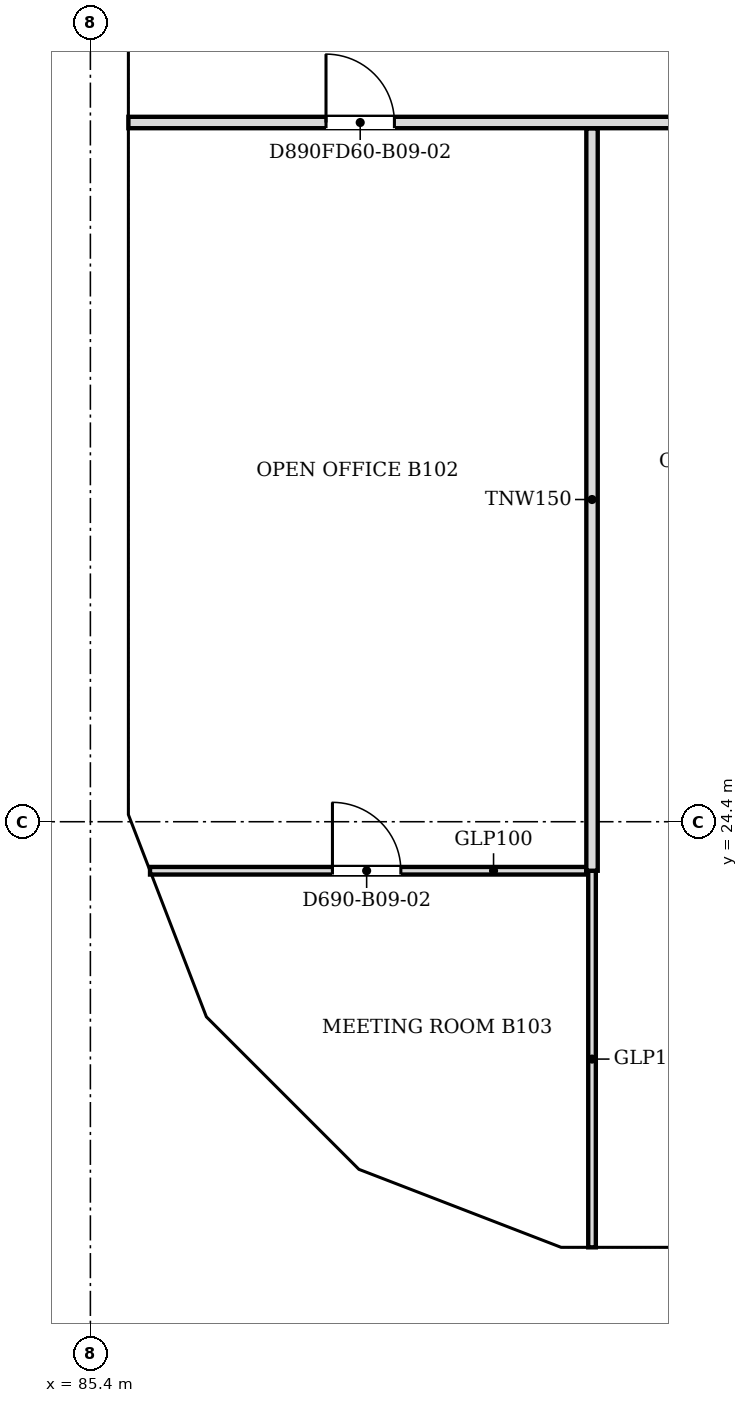
"""IFC4 building model, lengths in metres.
Left out: names, types, materials, properties, quantities, classifications, styles, units other than length and angle.
Written with IfcOpenShell. Run it as: python <this file> out.ifc"""

import sys

from ifc_helpers import new_model, si_unit, direction, frame, frame_2d, origin, place, context, subcontext, project, spatial, polyline, rectangle, outline, extrude, faceted_brep, source, transform, mapped, element, fill, save


model = new_model("IFC4")
c1 = context("Model", 3, precision=1e-05, world=origin(), true_north=direction((0.0, 1.0)))
c2 = subcontext(c1, "Body", "Model", "MODEL_VIEW")
j1 = project(units=[si_unit("LENGTHUNIT", "METRE"), si_unit("PLANEANGLEUNIT", "RADIAN")], contexts=[c1])
p1 = place(None, origin())
s1 = spatial("IfcSite", under=j1, at=p1, CompositionType="ELEMENT")
p2 = place(p1, origin())
s2 = spatial("IfcBuilding", under=s1, at=p2, CompositionType="ELEMENT")
p3 = place(p2, frame((0.0, 0.0, 87.6)))
s3 = spatial("IfcBuildingStorey", under=s2, at=p3, CompositionType="ELEMENT", Elevation=87.6)
m1 = source(origin(), c2, "Body", "Brep", [
    faceted_brep([(3.003, -0.25, 0.0), (6.053, -0.25, 3.8), (3.003, -0.25, 7.6), (0.0, -0.25, 3.8), (0.047, 0.25, 3.859), (3.003, 0.25, 7.6), (6.053, 0.25, 3.8), (3.003, 0.25, 0.0), (0.047, 0.25, 3.741), (0.0, 0.0, 3.8)], [[[0, 1, 2, 3]], [[4, 5, 6, 7, 8]], [[7, 6, 1, 0]], [[6, 5, 2, 1]], [[5, 4, 9, 3, 2]], [[8, 7, 0, 3, 9]], [[8, 9, 4]]]),
])
p4 = place(p3, frame((91.547, 18.55, -3.8), z_axis=(0.0, 0.0, 1.0), x_axis=(1.0, 0.0, 0.0)))
e1 = element("IfcWall", 1, at=p4, inside=s3, PredefinedType="SOLIDWALL", context=c2, shape_type="MappedRepresentation", body=[
    mapped(m1, transform((0.0, 0.0, 0.0), scale=1.0)),
])
m2 = source(origin(), c2, "Body", "SweptSolid", [
    extrude(outline(polyline([(3.005, 0.401), (5.733, 3.8), (3.005, 7.199), (0.319, 3.8), (3.005, 0.401)])), frame((0.0, 0.26, 0.0), z_axis=(0.0, -1.0, 0.0), x_axis=(1.0, 0.0, 0.0)), (0.0, 0.0, 1.0), 0.52),
])
p5 = place(p4, origin())
e2 = element("IfcOpeningElement", 2, at=p5, cuts=e1, PredefinedType="OPENING", context=c2, shape_type="MappedRepresentation", body=[
    mapped(m2, transform((0.0, 0.0, 0.0), scale=1.0)),
])
m3 = source(origin(), c2, "Body", "Brep", [
    faceted_brep([(3.05, -0.25, 0.0), (6.1, -0.25, 3.8), (6.1, -0.25, 3.8), (3.05, -0.25, 7.6), (0.0, -0.25, 3.8), (0.0, 0.25, 3.8), (3.05, 0.25, 7.6), (6.1, 0.25, 3.8), (6.1, 0.25, 3.8), (3.05, 0.25, 0.0)], [[[0, 1, 2, 3, 4]], [[5, 6, 7, 8, 9]], [[9, 8, 1, 0]], [[7, 6, 3, 2]], [[6, 5, 4, 3]], [[5, 9, 0, 4]], [[1, 8, 7, 2]]]),
])
p6 = place(p3, frame((85.65, 39.65, -3.8), z_axis=(0.0, 0.0, 1.0), x_axis=(0.0, -1.0, 0.0)))
e3 = element("IfcWall", 3, at=p6, inside=s3, PredefinedType="SOLIDWALL", context=c2, shape_type="MappedRepresentation", body=[
    mapped(m3, transform((0.0, 0.0, 0.0), scale=1.0)),
])
m4 = source(origin(), c2, "Body", "SweptSolid", [
    extrude(outline(polyline([(3.05, 0.399), (5.78, 3.8), (3.05, 7.2), (0.321, 3.8), (3.05, 0.399)])), frame((0.0, 0.26, 0.0), z_axis=(0.0, -1.0, 0.0), x_axis=(1.0, 0.0, 0.0)), (0.0, 0.0, 1.0), 0.52),
])
p7 = place(p6, origin())
e4 = element("IfcOpeningElement", 4, at=p7, cuts=e3, PredefinedType="OPENING", context=c2, shape_type="MappedRepresentation", body=[
    mapped(m4, transform((0.0, 0.0, 0.0), scale=1.0)),
])
m5 = source(origin(), c2, "Body", "SweptSolid", [
    extrude(outline(polyline([(3.05, 0.0), (6.1, 3.8), (3.05, 7.6), (0.0, 3.8), (3.05, 0.0)])), frame((0.0, 0.25, 0.0), z_axis=(0.0, -1.0, 0.0), x_axis=(1.0, 0.0, 0.0)), (0.0, 0.0, 1.0), 0.5),
])
p8 = place(p3, frame((85.65, 33.55, -3.8), z_axis=(0.0, 0.0, 1.0), x_axis=(0.0, -1.0, 0.0)))
e5 = element("IfcWall", 5, at=p8, inside=s3, PredefinedType="SOLIDWALL", context=c2, shape_type="MappedRepresentation", body=[
    mapped(m5, transform((0.0, 0.0, 0.0), scale=1.0)),
])
p9 = place(p8, origin())
e6 = element("IfcOpeningElement", 6, at=p9, cuts=e5, PredefinedType="OPENING", context=c2, shape_type="MappedRepresentation", body=[
    mapped(m4, transform((0.0, 0.0, 0.0), scale=1.0)),
])
m6 = source(origin(), c2, "Body", "Brep", [
    faceted_brep([(3.003, -0.25, 0.0), (3.05, -0.25, 0.06), (3.05, -0.25, 7.54), (3.003, -0.25, 7.6), (0.0, -0.25, 3.8), (0.0, 0.25, 3.8), (2.957, 0.25, 7.541), (2.957, 0.25, 0.059), (3.003, 0.0, 0.0), (3.003, 0.0, 7.6)], [[[0, 1, 2, 3, 4]], [[5, 6, 7]], [[1, 0, 8]], [[9, 3, 2]], [[6, 5, 4, 3, 9]], [[5, 7, 8, 0, 4]], [[1, 8, 7, 6, 9, 2]]]),
])
p10 = place(p3, frame((85.65, 27.45, -3.8), z_axis=(0.0, 0.0, 1.0), x_axis=(0.0, -1.0, 0.0)))
e7 = element("IfcWall", 7, at=p10, inside=s3, PredefinedType="SOLIDWALL", context=c2, shape_type="MappedRepresentation", body=[
    mapped(m6, transform((0.0, 0.0, 0.0), scale=1.0)),
])
m7 = source(origin(), c2, "Body", "SweptSolid", [
    extrude(outline(polyline([(2.803, 6.944), (0.319, 3.8), (2.803, 0.656), (2.803, 6.944)])), frame((0.0, 0.26, 0.0), z_axis=(0.0, -1.0, 0.0), x_axis=(1.0, 0.0, 0.0)), (0.0, 0.0, 1.0), 0.52),
])
p11 = place(p10, origin())
e8 = element("IfcOpeningElement", 8, at=p11, cuts=e7, PredefinedType="OPENING", context=c2, shape_type="MappedRepresentation", body=[
    mapped(m7, transform((0.0, 0.0, 0.0), scale=1.0)),
])
m8 = source(origin(), c2, "Body", "Brep", [
    faceted_brep([(0.047, -0.25, 0.0), (2.997, -0.25, 3.8), (0.047, -0.25, 7.6), (0.0, -0.25, 7.541), (0.0, -0.25, 0.059), (0.093, 0.25, 7.54), (2.944, 0.25, 3.868), (2.944, 0.25, 3.732), (0.093, 0.25, 0.06), (2.997, 0.0, 3.8), (0.047, 0.0, 0.0), (0.047, 0.0, 7.6)], [[[0, 1, 2, 3, 4]], [[5, 6, 7, 8]], [[8, 7, 9, 1, 0, 10]], [[6, 5, 11, 2, 1, 9]], [[3, 2, 11]], [[10, 0, 4]], [[8, 10, 4, 3, 11, 5]], [[7, 6, 9]]]),
])
p12 = place(p3, frame((85.633, 24.49, -3.8), z_axis=(0.0, 0.0, 1.0), x_axis=(0.359901446078, -0.932990326376, 0.0)))
e9 = element("IfcWall", 9, at=p12, inside=s3, PredefinedType="SOLIDWALL", context=c2, shape_type="MappedRepresentation", body=[
    mapped(m8, transform((0.0, 0.0, 0.0), scale=1.0)),
])
m9 = source(origin(), c2, "Body", "SweptSolid", [
    extrude(outline(polyline([(0.247, 0.665), (2.681, 3.8), (0.247, 6.935), (0.247, 0.665)])), frame((0.0, 0.26, 0.0), z_axis=(0.0, -1.0, 0.0), x_axis=(1.0, 0.0, 0.0)), (0.0, 0.0, 1.0), 0.52),
])
p13 = place(p12, origin())
e10 = element("IfcOpeningElement", 10, at=p13, cuts=e9, PredefinedType="OPENING", context=c2, shape_type="MappedRepresentation", body=[
    mapped(m9, transform((0.0, 0.0, 0.0), scale=1.0)),
])
m10 = source(origin(), c2, "Body", "Brep", [
    faceted_brep([(2.944, -0.25, 0.0), (2.997, -0.25, 0.068), (2.997, -0.25, 7.532), (2.944, -0.25, 7.6), (0.0, -0.25, 3.8), (0.053, 0.25, 3.868), (2.891, 0.25, 7.532), (2.891, 0.25, 0.068), (0.053, 0.25, 3.732), (2.944, 0.0, 0.0), (2.944, 0.0, 7.6), (0.0, 0.0, 3.8)], [[[0, 1, 2, 3, 4]], [[5, 6, 7, 8]], [[1, 0, 9]], [[10, 3, 2]], [[6, 5, 11, 4, 3, 10]], [[8, 7, 9, 0, 4, 11]], [[8, 11, 5]], [[1, 9, 7, 6, 10, 2]]]),
])
p14 = place(p3, frame((86.712, 21.694, -3.8), z_axis=(0.0, 0.0, 1.0), x_axis=(0.707066050402, -0.707147509625, 0.0)))
e11 = element("IfcWall", 11, at=p14, inside=s3, PredefinedType="SOLIDWALL", context=c2, shape_type="MappedRepresentation", body=[
    mapped(m10, transform((0.0, 0.0, 0.0), scale=1.0)),
])
m11 = source(origin(), c2, "Body", "SweptSolid", [
    extrude(outline(polyline([(2.744, 6.934), (0.316, 3.8), (2.744, 0.666), (2.744, 6.934)])), frame((0.0, 0.26, 0.0), z_axis=(0.0, -1.0, 0.0), x_axis=(1.0, 0.0, 0.0)), (0.0, 0.0, 1.0), 0.52),
])
p15 = place(p14, origin())
e12 = element("IfcOpeningElement", 12, at=p15, cuts=e11, PredefinedType="OPENING", context=c2, shape_type="MappedRepresentation", body=[
    mapped(m11, transform((0.0, 0.0, 0.0), scale=1.0)),
])
m12 = source(origin(), c2, "Body", "Brep", [
    faceted_brep([(0.053, -0.25, 0.0), (3.003, -0.25, 3.8), (0.053, -0.25, 7.6), (0.0, -0.25, 7.531), (0.0, -0.25, 0.068), (0.106, 0.25, 7.532), (2.957, 0.25, 3.86), (2.957, 0.25, 3.74), (0.106, 0.25, 0.068), (3.003, 0.0, 3.8), (0.053, 0.0, 0.0), (0.053, 0.0, 7.6)], [[[0, 1, 2, 3, 4]], [[5, 6, 7, 8]], [[8, 7, 9, 1, 0, 10]], [[6, 5, 11, 2, 1, 9]], [[3, 2, 11]], [[10, 0, 4]], [[8, 10, 4, 3, 11, 5]], [[7, 6, 9]]]),
])
p16 = place(p3, frame((88.744, 19.631, -3.8), z_axis=(0.0, 0.0, 1.0), x_axis=(0.932997369089, -0.359883188373, 0.0)))
e13 = element("IfcWall", 13, at=p16, inside=s3, PredefinedType="SOLIDWALL", context=c2, shape_type="MappedRepresentation", body=[
    mapped(m12, transform((0.0, 0.0, 0.0), scale=1.0)),
])
m13 = source(origin(), c2, "Body", "SweptSolid", [
    extrude(outline(polyline([(0.253, 0.665), (2.687, 3.8), (0.253, 6.935), (0.253, 0.665)])), frame((0.0, 0.26, 0.0), z_axis=(0.0, -1.0, 0.0), x_axis=(1.0, 0.0, 0.0)), (0.0, 0.0, 1.0), 0.52),
])
p17 = place(p16, origin())
e14 = element("IfcOpeningElement", 14, at=p17, cuts=e13, PredefinedType="OPENING", context=c2, shape_type="MappedRepresentation", body=[
    mapped(m13, transform((0.0, 0.0, 0.0), scale=1.0)),
])
p18 = place(p2, frame((0.0, 0.0, 91.4)))
s4 = spatial("IfcBuildingStorey", under=s2, at=p18, CompositionType="ELEMENT", Elevation=91.4)
m14 = source(origin(), c2, "Body", "Brep", [
    faceted_brep([(0.047, -0.25, 0.0), (3.05, -0.25, 3.8), (0.047, -0.25, 7.6), (0.0, -0.25, 7.54), (0.0, -0.25, 0.06), (0.093, 0.25, 7.541), (3.05, 0.25, 3.8), (0.093, 0.25, 0.059), (0.047, 0.0, 0.0), (0.047, 0.0, 7.6)], [[[0, 1, 2, 3, 4]], [[5, 6, 7]], [[7, 6, 1, 0, 8]], [[6, 5, 9, 2, 1]], [[3, 2, 9]], [[8, 0, 4]], [[7, 8, 4, 3, 9, 5]]]),
])
p19 = place(p18, frame((91.5, 18.55, -3.8), z_axis=(0.0, 0.0, 1.0), x_axis=(1.0, 0.0, 0.0)))
e15 = element("IfcWall", 15, at=p19, inside=s4, PredefinedType="SOLIDWALL", context=c2, shape_type="MappedRepresentation", body=[
    mapped(m14, transform((0.0, 0.0, 0.0), scale=1.0)),
])
m15 = source(origin(), c2, "Body", "SweptSolid", [
    extrude(outline(polyline([(0.247, 0.656), (2.731, 3.8), (0.247, 6.944), (0.247, 0.656)])), frame((0.0, 0.26, 0.0), z_axis=(0.0, -1.0, 0.0), x_axis=(1.0, 0.0, 0.0)), (0.0, 0.0, 1.0), 0.52),
])
p20 = place(p19, origin())
e16 = element("IfcOpeningElement", 16, at=p20, cuts=e15, PredefinedType="OPENING", context=c2, shape_type="MappedRepresentation", body=[
    mapped(m15, transform((0.0, 0.0, 0.0), scale=1.0)),
])
m16 = source(origin(), c2, "Body", "Brep", [
    faceted_brep([(2.95, -0.25, 0.0), (2.997, -0.25, 0.059), (2.997, -0.25, 7.541), (2.95, -0.25, 7.6), (0.0, -0.25, 3.8), (0.053, 0.25, 3.868), (2.904, 0.25, 7.54), (2.904, 0.25, 0.06), (0.053, 0.25, 3.732), (2.95, 0.0, 0.0), (2.95, 0.0, 7.6), (0.0, 0.0, 3.8)], [[[0, 1, 2, 3, 4]], [[5, 6, 7, 8]], [[1, 0, 9]], [[10, 3, 2]], [[6, 5, 11, 4, 3, 10]], [[8, 7, 9, 0, 4, 11]], [[8, 11, 5]], [[1, 9, 7, 6, 10, 2]]]),
])
p21 = place(p18, frame((88.794, 19.612, -3.8), z_axis=(0.0, 0.0, 1.0), x_axis=(0.933000876937, -0.359874094142, 0.0)))
e17 = element("IfcWall", 17, at=p21, inside=s4, PredefinedType="SOLIDWALL", context=c2, shape_type="MappedRepresentation", body=[
    mapped(m16, transform((0.0, 0.0, 0.0), scale=1.0)),
])
m17 = source(origin(), c2, "Body", "SweptSolid", [
    extrude(outline(polyline([(2.75, 6.935), (0.316, 3.8), (2.75, 0.665), (2.75, 6.935)])), frame((0.0, 0.26, 0.0), z_axis=(0.0, -1.0, 0.0), x_axis=(1.0, 0.0, 0.0)), (0.0, 0.0, 1.0), 0.52),
])
p22 = place(p21, origin())
e18 = element("IfcOpeningElement", 18, at=p22, cuts=e17, PredefinedType="OPENING", context=c2, shape_type="MappedRepresentation", body=[
    mapped(m17, transform((0.0, 0.0, 0.0), scale=1.0)),
])
m18 = source(origin(), c2, "Body", "SweptSolid", [
    extrude(outline(polyline([(3.05, 0.0), (6.1, 3.8), (3.05, 7.6), (0.0, 3.8), (3.05, 0.0)])), frame((0.0, 0.25, 0.0), z_axis=(0.0, -1.0, 0.0), x_axis=(1.0, 0.0, 0.0)), (0.0, 0.0, 1.0), 0.5),
])
p23 = place(p18, frame((85.65, 36.6, -3.8), z_axis=(0.0, 0.0, 1.0), x_axis=(0.0, -1.0, 0.0)))
e19 = element("IfcWall", 19, at=p23, inside=s4, PredefinedType="SOLIDWALL", context=c2, shape_type="MappedRepresentation", body=[
    mapped(m18, transform((0.0, 0.0, 0.0), scale=1.0)),
])
m19 = source(origin(), c2, "Body", "SweptSolid", [
    extrude(outline(polyline([(3.05, 0.399), (5.78, 3.8), (3.05, 7.2), (0.321, 3.8), (3.05, 0.399)])), frame((0.0, 0.26, 0.0), z_axis=(0.0, -1.0, 0.0), x_axis=(1.0, 0.0, 0.0)), (0.0, 0.0, 1.0), 0.52),
])
p24 = place(p23, origin())
e20 = element("IfcOpeningElement", 20, at=p24, cuts=e19, PredefinedType="OPENING", context=c2, shape_type="MappedRepresentation", body=[
    mapped(m19, transform((0.0, 0.0, 0.0), scale=1.0)),
])
m20 = source(origin(), c2, "Body", "Brep", [
    faceted_brep([(3.05, -0.25, 0.0), (6.053, -0.25, 3.8), (3.05, -0.25, 7.6), (0.0, -0.25, 3.8), (0.0, 0.25, 3.8), (3.05, 0.25, 7.6), (6.007, 0.25, 3.859), (6.007, 0.25, 3.741), (3.05, 0.25, 0.0), (6.053, 0.0, 3.8)], [[[0, 1, 2, 3]], [[4, 5, 6, 7, 8]], [[8, 7, 9, 1, 0]], [[6, 5, 2, 1, 9]], [[5, 4, 3, 2]], [[4, 8, 0, 3]], [[9, 7, 6]]]),
])
p25 = place(p18, frame((85.65, 30.5, -3.8), z_axis=(0.0, 0.0, 1.0), x_axis=(0.0, -1.0, 0.0)))
e21 = element("IfcWall", 21, at=p25, inside=s4, PredefinedType="SOLIDWALL", context=c2, shape_type="MappedRepresentation", body=[
    mapped(m20, transform((0.0, 0.0, 0.0), scale=1.0)),
])
m21 = source(origin(), c2, "Body", "SweptSolid", [
    extrude(outline(polyline([(3.049, 0.401), (5.735, 3.8), (3.049, 7.199), (0.321, 3.8), (3.049, 0.401)])), frame((0.0, 0.26, 0.0), z_axis=(0.0, -1.0, 0.0), x_axis=(1.0, 0.0, 0.0)), (0.0, 0.0, 1.0), 0.52),
])
p26 = place(p25, origin())
e22 = element("IfcOpeningElement", 22, at=p26, cuts=e21, PredefinedType="OPENING", context=c2, shape_type="MappedRepresentation", body=[
    mapped(m21, transform((0.0, 0.0, 0.0), scale=1.0)),
])
m22 = source(origin(), c2, "Body", "Brep", [
    faceted_brep([(2.95, -0.25, 0.0), (3.003, -0.25, 0.068), (3.003, -0.25, 7.531), (2.95, -0.25, 7.6), (0.0, -0.25, 3.8), (0.047, 0.25, 3.86), (2.898, 0.25, 7.532), (2.898, 0.25, 0.068), (0.047, 0.25, 3.74), (2.95, 0.0, 0.0), (2.95, 0.0, 7.6), (0.0, 0.0, 3.8)], [[[0, 1, 2, 3, 4]], [[5, 6, 7, 8]], [[1, 0, 9]], [[10, 3, 2]], [[6, 5, 11, 4, 3, 10]], [[8, 7, 9, 0, 4, 11]], [[8, 11, 5]], [[1, 9, 7, 6, 10, 2]]]),
])
p27 = place(p18, frame((85.65, 24.447, -3.8), z_axis=(0.0, 0.0, 1.0), x_axis=(0.35992665181, -0.932980602862, 0.0)))
e23 = element("IfcWall", 23, at=p27, inside=s4, PredefinedType="SOLIDWALL", context=c2, shape_type="MappedRepresentation", body=[
    mapped(m22, transform((0.0, 0.0, 0.0), scale=1.0)),
])
p28 = place(p27, origin())
e24 = element("IfcOpeningElement", 24, at=p28, cuts=e23, PredefinedType="OPENING", context=c2, shape_type="MappedRepresentation", body=[
    mapped(m17, transform((0.0, 0.0, 0.0), scale=1.0)),
])
m23 = source(origin(), c2, "Body", "Brep", [
    faceted_brep([(0.053, -0.25, 0.0), (2.997, -0.25, 3.8), (0.053, -0.25, 7.6), (0.0, -0.25, 7.532), (0.0, -0.25, 0.068), (0.106, 0.25, 7.531), (2.944, 0.25, 3.868), (2.944, 0.25, 3.732), (0.106, 0.25, 0.068), (2.997, 0.0, 3.8), (0.053, 0.0, 0.0), (0.053, 0.0, 7.6)], [[[0, 1, 2, 3, 4]], [[5, 6, 7, 8]], [[8, 7, 9, 1, 0, 10]], [[6, 5, 11, 2, 1, 9]], [[3, 2, 11]], [[10, 0, 4]], [[8, 10, 4, 3, 11, 5]], [[9, 7, 6]]]),
])
p29 = place(p18, frame((86.675, 21.731, -3.8), z_axis=(0.0, 0.0, 1.0), x_axis=(0.707106781187, -0.707106781187, 0.0)))
e25 = element("IfcWall", 25, at=p29, inside=s4, PredefinedType="SOLIDWALL", context=c2, shape_type="MappedRepresentation", body=[
    mapped(m23, transform((0.0, 0.0, 0.0), scale=1.0)),
])
m24 = source(origin(), c2, "Body", "SweptSolid", [
    extrude(outline(polyline([(0.253, 0.666), (2.681, 3.8), (0.253, 6.934), (0.253, 0.666)])), frame((0.0, 0.26, 0.0), z_axis=(0.0, -1.0, 0.0), x_axis=(1.0, 0.0, 0.0)), (0.0, 0.0, 1.0), 0.52),
])
p30 = place(p29, origin())
e26 = element("IfcOpeningElement", 26, at=p30, cuts=e25, PredefinedType="OPENING", context=c2, shape_type="MappedRepresentation", body=[
    mapped(m24, transform((0.0, 0.0, 0.0), scale=1.0)),
])
p31 = place(p3, frame((92.0, 18.8, 0.0), z_axis=(0.0, 0.0, 1.0), x_axis=(0.0, 1.0, 0.0)))
e27 = element("IfcWall", 27, at=p31, inside=s3, PredefinedType="PARTITIONING", context=c2, shape_type="SweptSolid", body=[
    extrude(rectangle(XDim=4.954, YDim=0.1, at=frame_2d((2.477, 0.0))), origin(), (0.0, 0.0, 1.0), 3.067),
])
p32 = place(p3, frame((91.924, 23.755, 0.0), z_axis=(0.0, 0.0, 1.0), x_axis=(-1.0, 0.0, 0.0)))
e28 = element("IfcWall", 28, at=p32, inside=s3, PredefinedType="PARTITIONING", context=c2, shape_type="SweptSolid", body=[
    extrude(rectangle(XDim=5.739, YDim=0.1, at=frame_2d((2.87, 0.0))), origin(), (0.0, 0.0, 1.0), 3.067),
])
m25 = source(origin(), c2, "Body", "SweptSolid", [
    extrude(rectangle(XDim=0.9, YDim=2.1, at=frame_2d((0.45, 1.05))), frame((0.0, 0.06, 0.0), z_axis=(0.0, -1.0, 0.0), x_axis=(1.0, 0.0, 0.0)), (0.0, 0.0, 1.0), 0.12),
])
p33 = place(p32, frame((2.439, 0.0, 0.0)))
e29 = element("IfcOpeningElement", 29, at=p33, cuts=e28, PredefinedType="OPENING", context=c2, shape_type="MappedRepresentation", body=[
    mapped(m25, transform((0.0, 0.0, 0.0), scale=1.0)),
])
p34 = place(p3, frame((92.0, 23.755, 0.0), z_axis=(0.0, 0.0, 1.0), x_axis=(0.0, 1.0, 0.0)))
e30 = element("IfcWall", 30, at=p34, inside=s3, PredefinedType="PARTITIONING", context=c2, shape_type="SweptSolid", body=[
    extrude(rectangle(XDim=9.769, YDim=0.15, at=frame_2d((4.885, 0.0))), origin(), (0.0, 0.0, 1.0), 3.067),
])
p35 = place(p3, frame((133.7, 33.6, 0.0), z_axis=(0.0, 0.0, 1.0), x_axis=(-1.0, 0.0, 0.0)))
e31 = element("IfcWall", 31, at=p35, inside=s3, PredefinedType="PARTITIONING", context=c2, shape_type="SweptSolid", body=[
    extrude(rectangle(XDim=47.8, YDim=0.15, at=frame_2d((23.9, 0.0))), origin(), (0.0, 0.0, 1.0), 3.067),
])
m26 = source(origin(), c2, "Body", "SweptSolid", [
    extrude(rectangle(XDim=0.9, YDim=2.1, at=frame_2d((0.45, 1.05))), frame((0.0, 0.085, 0.0), z_axis=(0.0, -1.0, 0.0), x_axis=(1.0, 0.0, 0.0)), (0.0, 0.0, 1.0), 0.17),
])
p36 = place(p35, frame((2.099, 0.0, 0.0)))
e32 = element("IfcOpeningElement", 32, at=p36, cuts=e31, PredefinedType="OPENING", context=c2, shape_type="MappedRepresentation", body=[
    mapped(m26, transform((0.0, 0.0, 0.0), scale=1.0)),
])
m27 = source(origin(), c2, "Body", "SweptSolid", [
    extrude(rectangle(XDim=1.0, YDim=2.1, at=frame_2d((0.5, 1.05))), frame((0.0, 0.085, 0.0), z_axis=(0.0, -1.0, 0.0), x_axis=(1.0, 0.0, 0.0)), (0.0, 0.0, 1.0), 0.17),
])
p37 = place(p35, frame((38.399, 0.0, 0.0)))
e33 = element("IfcOpeningElement", 33, at=p37, cuts=e31, PredefinedType="OPENING", context=c2, shape_type="MappedRepresentation", body=[
    mapped(m27, transform((0.0, 0.0, 0.0), scale=1.0)),
])
p38 = place(p35, frame((44.3, 0.0, 0.0)))
e34 = element("IfcOpeningElement", 34, at=p38, cuts=e31, PredefinedType="OPENING", context=c2, shape_type="MappedRepresentation", body=[
    mapped(m26, transform((0.0, 0.0, 0.0), scale=1.0)),
])
p39 = place(p35, frame((32.4, 0.0, 0.0)))
e35 = element("IfcOpeningElement", 35, at=p39, cuts=e31, PredefinedType="OPENING", context=c2, shape_type="MappedRepresentation", body=[
    mapped(m26, transform((0.0, 0.0, 0.0), scale=1.0)),
])
p40 = place(p35, frame((10.799, 0.0, 0.0)))
e36 = element("IfcOpeningElement", 36, at=p40, cuts=e31, PredefinedType="OPENING", context=c2, shape_type="MappedRepresentation", body=[
    mapped(m26, transform((0.0, 0.0, 0.0), scale=1.0)),
])
p41 = place(p35, frame((23.0, 0.0, 0.0)))
e37 = element("IfcOpeningElement", 37, at=p41, cuts=e31, PredefinedType="OPENING", context=c2, shape_type="MappedRepresentation", body=[
    mapped(m26, transform((0.0, 0.0, 0.0), scale=1.0)),
])
m28 = source(origin(), c2, "Body", "SweptSolid", [
    extrude(rectangle(XDim=0.9, YDim=2.1, at=frame_2d((0.45, 1.05))), frame((0.0, 0.025, 0.0), z_axis=(0.0, -1.0, 0.0), x_axis=(1.0, 0.0, 0.0)), (0.0, 0.0, 1.0), 0.05),
])
p42 = place(p33, origin())
e38 = element("IfcDoor", 38, at=p42, inside=s3, OperationType="SINGLE_SWING_RIGHT", PredefinedType="DOOR", context=c2, shape_type="MappedRepresentation", body=[
    mapped(m28, transform((0.0, 0.0, 0.0), scale=1.0)),
])
fill(e29, e38)
p43 = place(p38, origin())
e39 = element("IfcDoor", 39, at=p43, inside=s3, OperationType="SINGLE_SWING_RIGHT", PredefinedType="DOOR", context=c2, shape_type="MappedRepresentation", body=[
    mapped(m28, transform((0.0, 0.0, 0.0), scale=1.0)),
])
fill(e34, e39)
save(model, sys.argv[1])
